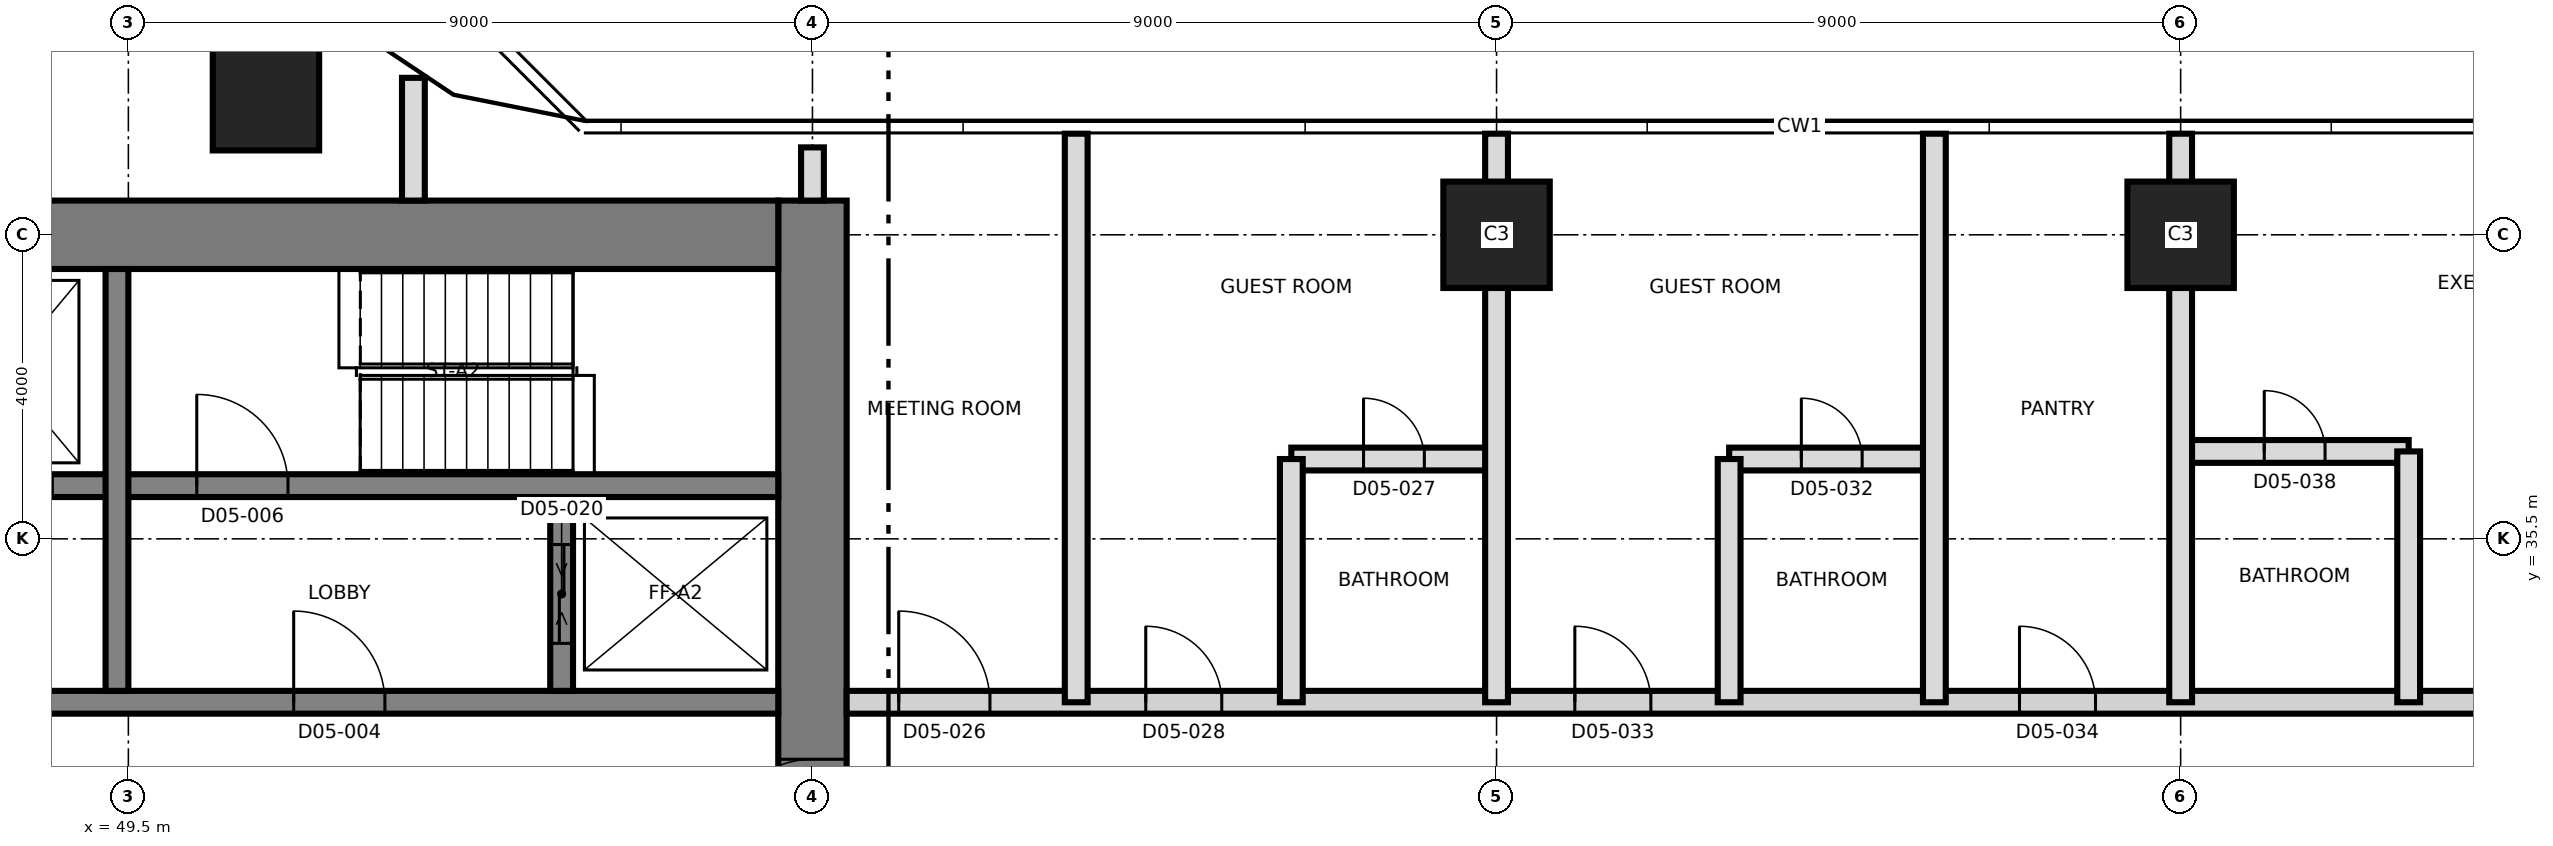
"""IFC4 building model, lengths in metres.
Left out: names, types, materials, properties, quantities, classifications, styles, units other than length and angle.
Written with IfcOpenShell. Run it as: python <this file> out.ifc"""

import sys

from ifc_helpers import new_model, si_unit, direction, frame, frame_2d, origin, origin_2d, place, context, subcontext, project, spatial, rectangle, extrude, element, fill, save


model = new_model("IFC4")
c1 = context("Model", 3, precision=1e-05, world=origin(), true_north=direction((0.0, 1.0)))
c2 = subcontext(c1, "Body", "Model", "MODEL_VIEW")
j1 = project(units=[si_unit("LENGTHUNIT", "METRE"), si_unit("PLANEANGLEUNIT", "RADIAN")], contexts=[c1])
p1 = place(None, origin())
s1 = spatial("IfcSite", under=j1, at=p1, CompositionType="ELEMENT")
p2 = place(p1, origin())
s2 = spatial("IfcBuilding", under=s1, at=p2, CompositionType="ELEMENT")
p3 = place(p2, frame((0.0, 0.0, 70.5)))
s3 = spatial("IfcBuildingStorey", under=s2, at=p3, CompositionType="ELEMENT", Elevation=70.5)
p4 = place(p3, frame((58.5, 21.05, 0.0), z_axis=(0.0, 0.0, 1.0), x_axis=(0.0, 1.0, 0.0)))
e1 = element("IfcWall", 1, at=p4, inside=s3, PredefinedType="SHEAR", context=c2, shape_type="SweptSolid", body=[
    extrude(rectangle(XDim=18.9, YDim=0.9, at=frame_2d((9.45, 0.0))), origin(), (0.0, 0.0, 1.0), 3.7),
])
p5 = place(p4, frame((10.35, 0.0, 0.0)))
e2 = element("IfcOpeningElement", 2, at=p5, cuts=e1, PredefinedType="OPENING", context=c2, shape_type="SweptSolid", body=[
    extrude(rectangle(XDim=1.2, YDim=2.1, at=frame_2d((0.6, 1.05))), frame((0.0, 0.46, 0.0), z_axis=(0.0, -1.0, 0.0), x_axis=(1.0, 0.0, 0.0)), (0.0, 0.0, 1.0), 0.92),
])
p6 = place(p3, frame((31.05, 39.5, 0.0), z_axis=(0.0, 0.0, 1.0), x_axis=(1.0, 0.0, 0.0)))
e3 = element("IfcWall", 3, at=p6, inside=s3, PredefinedType="SHEAR", context=c2, shape_type="SweptSolid", body=[
    extrude(rectangle(XDim=27.0, YDim=0.9, at=frame_2d((13.5, 0.0))), origin(), (0.0, 0.0, 1.0), 3.7),
])
p7 = place(p6, frame((10.65, 0.0, 0.0)))
e4 = element("IfcOpeningElement", 4, at=p7, cuts=e3, PredefinedType="OPENING", context=c2, shape_type="SweptSolid", body=[
    extrude(rectangle(XDim=1.2, YDim=2.1, at=frame_2d((0.6, 1.05))), frame((0.0, 0.46, 0.0), z_axis=(0.0, -1.0, 0.0), x_axis=(1.0, 0.0, 0.0)), (0.0, 0.0, 1.0), 0.92),
])
p8 = place(p3, frame((31.95, 33.35, 0.0), z_axis=(0.0, 0.0, 1.0), x_axis=(1.0, 0.0, 0.0)))
e5 = element("IfcWall", 5, at=p8, inside=s3, PredefinedType="SHEAR", context=c2, shape_type="SweptSolid", body=[
    extrude(rectangle(XDim=26.1, YDim=0.3, at=frame_2d((13.05, 0.0))), origin(), (0.0, 0.0, 1.0), 3.7),
])
p9 = place(p8, frame((13.7, 0.0, 0.0)))
e6 = element("IfcOpeningElement", 6, at=p9, cuts=e5, PredefinedType="OPENING", context=c2, shape_type="SweptSolid", body=[
    extrude(rectangle(XDim=1.4, YDim=2.1, at=frame_2d((0.7, 1.05))), frame((0.0, 0.16, 0.0), z_axis=(0.0, -1.0, 0.0), x_axis=(1.0, 0.0, 0.0)), (0.0, 0.0, 1.0), 0.32),
])
p10 = place(p8, frame((5.175, 0.0, 0.0)))
e7 = element("IfcOpeningElement", 7, at=p10, cuts=e5, PredefinedType="OPENING", context=c2, shape_type="SweptSolid", body=[
    extrude(rectangle(XDim=1.2, YDim=2.1, at=frame_2d((0.6, 1.05))), frame((0.0, 0.16, 0.0), z_axis=(0.0, -1.0, 0.0), x_axis=(1.0, 0.0, 0.0)), (0.0, 0.0, 1.0), 0.32),
])
p11 = place(p8, frame((19.725, 0.0, 0.0)))
e8 = element("IfcOpeningElement", 8, at=p11, cuts=e5, PredefinedType="OPENING", context=c2, shape_type="SweptSolid", body=[
    extrude(rectangle(XDim=1.2, YDim=2.1, at=frame_2d((0.6, 1.05))), frame((0.0, 0.16, 0.0), z_axis=(0.0, -1.0, 0.0), x_axis=(1.0, 0.0, 0.0)), (0.0, 0.0, 1.0), 0.32),
])
p12 = place(p3, frame((43.5, 36.2, 0.0), z_axis=(0.0, 0.0, 1.0), x_axis=(1.0, 0.0, 0.0)))
e9 = element("IfcWall", 9, at=p12, inside=s3, PredefinedType="SHEAR", context=c2, shape_type="SweptSolid", body=[
    extrude(rectangle(XDim=14.55, YDim=0.3, at=frame_2d((7.275, 0.0))), origin(), (0.0, 0.0, 1.0), 3.7),
])
p13 = place(p12, frame((6.9, 0.0, 0.0)))
e10 = element("IfcOpeningElement", 10, at=p13, cuts=e9, PredefinedType="OPENING", context=c2, shape_type="SweptSolid", body=[
    extrude(rectangle(XDim=1.2, YDim=2.1, at=frame_2d((0.6, 1.05))), frame((0.0, 0.16, 0.0), z_axis=(0.0, -1.0, 0.0), x_axis=(1.0, 0.0, 0.0)), (0.0, 0.0, 1.0), 0.32),
])
p14 = place(p12, frame((0.7, 0.0, 0.0)))
e11 = element("IfcOpeningElement", 11, at=p14, cuts=e9, PredefinedType="OPENING", context=c2, shape_type="SweptSolid", body=[
    extrude(rectangle(XDim=1.3, YDim=2.4, at=frame_2d((0.65, 1.2))), frame((0.0, 0.16, 0.0), z_axis=(0.0, -1.0, 0.0), x_axis=(1.0, 0.0, 0.0)), (0.0, 0.0, 1.0), 0.32),
])
p15 = place(p12, frame((3.7, 0.0, 0.0)))
e12 = element("IfcOpeningElement", 12, at=p15, cuts=e9, PredefinedType="OPENING", context=c2, shape_type="SweptSolid", body=[
    extrude(rectangle(XDim=1.3, YDim=2.4, at=frame_2d((0.65, 1.2))), frame((0.0, 0.16, 0.0), z_axis=(0.0, -1.0, 0.0), x_axis=(1.0, 0.0, 0.0)), (0.0, 0.0, 1.0), 0.32),
])
p16 = place(p3, frame((49.35, 33.5, 0.0), z_axis=(0.0, 0.0, 1.0), x_axis=(0.0, 1.0, 0.0)))
e13 = element("IfcWall", 13, at=p16, inside=s3, PredefinedType="SHEAR", context=c2, shape_type="SweptSolid", body=[
    extrude(rectangle(XDim=5.55, YDim=0.3, at=frame_2d((2.775, 0.0))), origin(), (0.0, 0.0, 1.0), 3.7),
])
p17 = place(p3, frame((55.2, 33.5, 0.0), z_axis=(0.0, 0.0, 1.0), x_axis=(0.0, 1.0, 0.0)))
e14 = element("IfcWall", 14, at=p17, inside=s3, PredefinedType="SHEAR", context=c2, shape_type="SweptSolid", body=[
    extrude(rectangle(XDim=2.55, YDim=0.3, at=frame_2d((1.275, 0.0))), origin(), (0.0, 0.0, 1.0), 3.7),
])
p18 = place(p17, frame((0.625, 0.0, 0.0)))
e15 = element("IfcOpeningElement", 15, at=p18, cuts=e14, PredefinedType="OPENING", context=c2, shape_type="SweptSolid", body=[
    extrude(rectangle(XDim=1.3, YDim=2.4, at=frame_2d((0.65, 1.2))), frame((0.0, 0.16, 0.0), z_axis=(0.0, -1.0, 0.0), x_axis=(1.0, 0.0, 0.0)), (0.0, 0.0, 1.0), 0.32),
])
for number, where, z_axis, x_axis in (
    (16, (67.5, 39.5, 0.0), (0.0, 0.0, 1.0), (1.0, 0.0, 0.0)),
    (17, (76.5, 39.5, 0.0), (0.0, 0.0, 1.0), (1.0, 0.0, 0.0)),
    (18, (51.31, 41.31, 0.0), (0.0, 0.0, 1.0), (1.0, 0.0, 0.0)),
):
    element("IfcColumn", number, at=place(p3, frame(where, z_axis=z_axis, x_axis=x_axis)), inside=s3, PredefinedType="COLUMN", context=c2, shape_type="SweptSolid", body=[
        extrude(rectangle(XDim=1.4, YDim=1.4, at=origin_2d()), origin(), (0.0, 0.0, 1.0), 3.7),
    ])
p19 = place(p3, frame((58.95, 33.35, 0.0), z_axis=(0.0, 0.0, 1.0), x_axis=(1.0, 0.0, 0.0)))
e19 = element("IfcWall", 19, at=p19, inside=s3, PredefinedType="PARTITIONING", context=c2, shape_type="SweptSolid", body=[
    extrude(rectangle(XDim=26.38, YDim=0.3, at=frame_2d((13.19, 0.0))), origin(), (0.0, 0.0, 1.0), 3.4),
])
p20 = place(p19, frame((0.685, 0.0, 0.0)))
e20 = element("IfcOpeningElement", 20, at=p20, cuts=e19, PredefinedType="OPENING", context=c2, shape_type="SweptSolid", body=[
    extrude(rectangle(XDim=1.2, YDim=2.1, at=frame_2d((0.6, 1.05))), frame((0.0, 0.16, 0.0), z_axis=(0.0, -1.0, 0.0), x_axis=(1.0, 0.0, 0.0)), (0.0, 0.0, 1.0), 0.32),
])
p21 = place(p19, frame((3.935, 0.0, 0.0)))
e21 = element("IfcOpeningElement", 21, at=p21, cuts=e19, PredefinedType="OPENING", context=c2, shape_type="SweptSolid", body=[
    extrude(rectangle(XDim=1.0, YDim=2.1, at=frame_2d((0.5, 1.05))), frame((0.0, 0.16, 0.0), z_axis=(0.0, -1.0, 0.0), x_axis=(1.0, 0.0, 0.0)), (0.0, 0.0, 1.0), 0.32),
])
p22 = place(p19, frame((9.58, 0.0, 0.0)))
e22 = element("IfcOpeningElement", 22, at=p22, cuts=e19, PredefinedType="OPENING", context=c2, shape_type="SweptSolid", body=[
    extrude(rectangle(XDim=1.0, YDim=2.1, at=frame_2d((0.5, 1.05))), frame((0.0, 0.16, 0.0), z_axis=(0.0, -1.0, 0.0), x_axis=(1.0, 0.0, 0.0)), (0.0, 0.0, 1.0), 0.32),
])
p23 = place(p19, frame((15.43, 0.0, 0.0)))
e23 = element("IfcOpeningElement", 23, at=p23, cuts=e19, PredefinedType="OPENING", context=c2, shape_type="SweptSolid", body=[
    extrude(rectangle(XDim=1.0, YDim=2.1, at=frame_2d((0.5, 1.05))), frame((0.0, 0.16, 0.0), z_axis=(0.0, -1.0, 0.0), x_axis=(1.0, 0.0, 0.0)), (0.0, 0.0, 1.0), 0.32),
])
p24 = place(p19, frame((21.55, 0.0, 0.0)))
e24 = element("IfcOpeningElement", 24, at=p24, cuts=e19, PredefinedType="OPENING", context=c2, shape_type="SweptSolid", body=[
    extrude(rectangle(XDim=1.0, YDim=2.4, at=frame_2d((0.5, 1.2))), frame((0.0, 0.16, 0.0), z_axis=(0.0, -1.0, 0.0), x_axis=(1.0, 0.0, 0.0)), (0.0, 0.0, 1.0), 0.32),
])
p25 = place(p3, frame((64.8, 36.55, 0.0), z_axis=(0.0, 0.0, 1.0), x_axis=(1.0, 0.0, 0.0)))
e25 = element("IfcWall", 25, at=p25, inside=s3, PredefinedType="PARTITIONING", context=c2, shape_type="SweptSolid", body=[
    extrude(rectangle(XDim=2.7, YDim=0.3, at=frame_2d((1.35, 0.0))), origin(), (0.0, 0.0, 1.0), 3.4),
])
p26 = place(p25, frame((0.95, 0.0, 0.0)))
e26 = element("IfcOpeningElement", 26, at=p26, cuts=e25, PredefinedType="OPENING", context=c2, shape_type="SweptSolid", body=[
    extrude(rectangle(XDim=0.8, YDim=2.1, at=frame_2d((0.4, 1.05))), frame((0.0, 0.16, 0.0), z_axis=(0.0, -1.0, 0.0), x_axis=(1.0, 0.0, 0.0)), (0.0, 0.0, 1.0), 0.32),
])
p27 = place(p3, frame((70.56, 36.55, 0.0), z_axis=(0.0, 0.0, 1.0), x_axis=(1.0, 0.0, 0.0)))
e27 = element("IfcWall", 27, at=p27, inside=s3, PredefinedType="PARTITIONING", context=c2, shape_type="SweptSolid", body=[
    extrude(rectangle(XDim=2.7, YDim=0.3, at=frame_2d((1.35, 0.0))), origin(), (0.0, 0.0, 1.0), 3.4),
])
p28 = place(p27, frame((0.95, 0.0, 0.0)))
e28 = element("IfcOpeningElement", 28, at=p28, cuts=e27, PredefinedType="OPENING", context=c2, shape_type="SweptSolid", body=[
    extrude(rectangle(XDim=0.8, YDim=2.1, at=frame_2d((0.4, 1.05))), frame((0.0, 0.16, 0.0), z_axis=(0.0, -1.0, 0.0), x_axis=(1.0, 0.0, 0.0)), (0.0, 0.0, 1.0), 0.32),
])
p29 = place(p3, frame((76.5, 36.65, 0.0), z_axis=(0.0, 0.0, 1.0), x_axis=(1.0, 0.0, 0.0)))
e29 = element("IfcWall", 29, at=p29, inside=s3, PredefinedType="PARTITIONING", context=c2, shape_type="SweptSolid", body=[
    extrude(rectangle(XDim=3.0, YDim=0.3, at=frame_2d((1.5, 0.0))), origin(), (0.0, 0.0, 1.0), 3.4),
])
p30 = place(p29, frame((1.1, 0.0, 0.0)))
e30 = element("IfcOpeningElement", 30, at=p30, cuts=e29, PredefinedType="OPENING", context=c2, shape_type="SweptSolid", body=[
    extrude(rectangle(XDim=0.8, YDim=2.1, at=frame_2d((0.4, 1.05))), frame((0.0, 0.16, 0.0), z_axis=(0.0, -1.0, 0.0), x_axis=(1.0, 0.0, 0.0)), (0.0, 0.0, 1.0), 0.32),
])
p31 = place(p3, frame((53.25, 39.95, 0.0), z_axis=(0.0, 0.0, 1.0), x_axis=(0.0, 1.0, 0.0)))
e31 = element("IfcWall", 31, at=p31, inside=s3, PredefinedType="PARTITIONING", context=c2, shape_type="SweptSolid", body=[
    extrude(rectangle(XDim=1.615, YDim=0.3, at=frame_2d((0.808, 0.0))), origin(), (0.0, 0.0, 1.0), 3.4),
])
p32 = place(p3, frame((58.5, 39.95, 0.0), z_axis=(0.0, 0.0, 1.0), x_axis=(0.0, 1.0, 0.0)))
e32 = element("IfcWall", 32, at=p32, inside=s3, PredefinedType="PARTITIONING", context=c2, shape_type="SweptSolid", body=[
    extrude(rectangle(XDim=0.7, YDim=0.3, at=frame_2d((0.35, 0.0))), origin(), (0.0, 0.0, 1.0), 3.4),
])
p33 = place(p3, frame((61.97, 33.35, 0.0), z_axis=(0.0, 0.0, 1.0), x_axis=(0.0, 1.0, 0.0)))
e33 = element("IfcWall", 33, at=p33, inside=s3, PredefinedType="PARTITIONING", context=c2, shape_type="SweptSolid", body=[
    extrude(rectangle(XDim=7.48, YDim=0.3, at=frame_2d((3.74, 0.0))), origin(), (0.0, 0.0, 1.0), 3.4),
])
p34 = place(p3, frame((64.8, 33.35, 0.0), z_axis=(0.0, 0.0, 1.0), x_axis=(0.0, 1.0, 0.0)))
e34 = element("IfcWall", 34, at=p34, inside=s3, PredefinedType="PARTITIONING", context=c2, shape_type="SweptSolid", body=[
    extrude(rectangle(XDim=3.2, YDim=0.3, at=frame_2d((1.6, 0.0))), origin(), (0.0, 0.0, 1.0), 3.4),
])
p35 = place(p3, frame((67.5, 33.35, 0.0), z_axis=(0.0, 0.0, 1.0), x_axis=(0.0, 1.0, 0.0)))
e35 = element("IfcWall", 35, at=p35, inside=s3, PredefinedType="PARTITIONING", context=c2, shape_type="SweptSolid", body=[
    extrude(rectangle(XDim=7.48, YDim=0.3, at=frame_2d((3.74, 0.0))), origin(), (0.0, 0.0, 1.0), 3.4),
])
p36 = place(p3, frame((70.56, 33.35, 0.0), z_axis=(0.0, 0.0, 1.0), x_axis=(0.0, 1.0, 0.0)))
e36 = element("IfcWall", 36, at=p36, inside=s3, PredefinedType="PARTITIONING", context=c2, shape_type="SweptSolid", body=[
    extrude(rectangle(XDim=3.2, YDim=0.3, at=frame_2d((1.6, 0.0))), origin(), (0.0, 0.0, 1.0), 3.4),
])
for number, where, z_axis, x_axis in (
    (37, (73.26, 33.35, 0.0), (0.0, 0.0, 1.0), (0.0, 1.0, 0.0)),
    (38, (76.5, 33.35, 0.0), (0.0, 0.0, 1.0), (0.0, 1.0, 0.0)),
):
    element("IfcWall", number, at=place(p3, frame(where, z_axis=z_axis, x_axis=x_axis)), inside=s3, PredefinedType="PARTITIONING", context=c2, shape_type="SweptSolid", body=[
        extrude(rectangle(XDim=7.48, YDim=0.3, at=frame_2d((3.74, 0.0))), origin(), (0.0, 0.0, 1.0), 3.4),
    ])
p37 = place(p3, frame((79.5, 33.35, 0.0), z_axis=(0.0, 0.0, 1.0), x_axis=(0.0, 1.0, 0.0)))
e39 = element("IfcWall", 39, at=p37, inside=s3, PredefinedType="PARTITIONING", context=c2, shape_type="SweptSolid", body=[
    extrude(rectangle(XDim=3.3, YDim=0.3, at=frame_2d((1.65, 0.0))), origin(), (0.0, 0.0, 1.0), 3.4),
])
p38 = place(p11, origin())
e40 = element("IfcDoor", 40, at=p38, inside=s3, OperationType="SINGLE_SWING_RIGHT", PredefinedType="DOOR", context=c2, shape_type="SweptSolid", body=[
    extrude(rectangle(XDim=1.2, YDim=2.1, at=frame_2d((0.6, 1.05))), frame((0.0, 0.025, 0.0), z_axis=(0.0, -1.0, 0.0), x_axis=(1.0, 0.0, 0.0)), (0.0, 0.0, 1.0), 0.05),
])
fill(e8, e40)
p39 = place(p13, origin())
e41 = element("IfcDoor", 41, at=p39, inside=s3, OperationType="SINGLE_SWING_LEFT", PredefinedType="DOOR", context=c2, shape_type="SweptSolid", body=[
    extrude(rectangle(XDim=1.2, YDim=2.1, at=frame_2d((0.6, 1.05))), frame((0.0, 0.025, 0.0), z_axis=(0.0, -1.0, 0.0), x_axis=(1.0, 0.0, 0.0)), (0.0, 0.0, 1.0), 0.05),
])
fill(e10, e41)
p40 = place(p5, origin())
e42 = element("IfcDoor", 42, at=p40, inside=s3, OperationType="SINGLE_SWING_LEFT", PredefinedType="DOOR", context=c2, shape_type="SweptSolid", body=[
    extrude(rectangle(XDim=1.2, YDim=2.1, at=frame_2d((0.6, 1.05))), frame((0.0, 0.025, 0.0), z_axis=(0.0, -1.0, 0.0), x_axis=(1.0, 0.0, 0.0)), (0.0, 0.0, 1.0), 0.05),
])
fill(e2, e42)
p41 = place(p18, origin())
e43 = element("IfcDoor", 43, at=p41, inside=s3, OperationType="SLIDING_TO_LEFT", PredefinedType="DOOR", context=c2, shape_type="SweptSolid", body=[
    extrude(rectangle(XDim=1.3, YDim=2.4, at=frame_2d((0.65, 1.2))), frame((0.0, 0.025, 0.0), z_axis=(0.0, -1.0, 0.0), x_axis=(1.0, 0.0, 0.0)), (0.0, 0.0, 1.0), 0.05),
])
fill(e15, e43)
p42 = place(p20, origin())
e44 = element("IfcDoor", 44, at=p42, inside=s3, OperationType="SINGLE_SWING_LEFT", PredefinedType="DOOR", context=c2, shape_type="SweptSolid", body=[
    extrude(rectangle(XDim=1.2, YDim=2.1, at=frame_2d((0.6, 1.05))), frame((0.0, 0.025, 0.0), z_axis=(0.0, -1.0, 0.0), x_axis=(1.0, 0.0, 0.0)), (0.0, 0.0, 1.0), 0.05),
])
fill(e20, e44)
p43 = place(p26, origin())
e45 = element("IfcDoor", 45, at=p43, inside=s3, OperationType="SINGLE_SWING_RIGHT", PredefinedType="DOOR", context=c2, shape_type="SweptSolid", body=[
    extrude(rectangle(XDim=0.8, YDim=2.1, at=frame_2d((0.4, 1.05))), frame((0.0, 0.025, 0.0), z_axis=(0.0, -1.0, 0.0), x_axis=(1.0, 0.0, 0.0)), (0.0, 0.0, 1.0), 0.05),
])
fill(e26, e45)
p44 = place(p21, origin())
e46 = element("IfcDoor", 46, at=p44, inside=s3, OperationType="SINGLE_SWING_LEFT", PredefinedType="DOOR", context=c2, shape_type="SweptSolid", body=[
    extrude(rectangle(XDim=1.0, YDim=2.1, at=frame_2d((0.5, 1.05))), frame((0.0, 0.025, 0.0), z_axis=(0.0, -1.0, 0.0), x_axis=(1.0, 0.0, 0.0)), (0.0, 0.0, 1.0), 0.05),
])
fill(e21, e46)
p45 = place(p28, origin())
e47 = element("IfcDoor", 47, at=p45, inside=s3, OperationType="SINGLE_SWING_LEFT", PredefinedType="DOOR", context=c2, shape_type="SweptSolid", body=[
    extrude(rectangle(XDim=0.8, YDim=2.1, at=frame_2d((0.4, 1.05))), frame((0.0, 0.025, 0.0), z_axis=(0.0, -1.0, 0.0), x_axis=(1.0, 0.0, 0.0)), (0.0, 0.0, 1.0), 0.05),
])
fill(e28, e47)
p46 = place(p22, origin())
e48 = element("IfcDoor", 48, at=p46, inside=s3, OperationType="SINGLE_SWING_LEFT", PredefinedType="DOOR", context=c2, shape_type="SweptSolid", body=[
    extrude(rectangle(XDim=1.0, YDim=2.1, at=frame_2d((0.5, 1.05))), frame((0.0, 0.025, 0.0), z_axis=(0.0, -1.0, 0.0), x_axis=(1.0, 0.0, 0.0)), (0.0, 0.0, 1.0), 0.05),
])
fill(e22, e48)
p47 = place(p23, origin())
e49 = element("IfcDoor", 49, at=p47, inside=s3, OperationType="SINGLE_SWING_RIGHT", PredefinedType="DOOR", context=c2, shape_type="SweptSolid", body=[
    extrude(rectangle(XDim=1.0, YDim=2.1, at=frame_2d((0.5, 1.05))), frame((0.0, 0.025, 0.0), z_axis=(0.0, -1.0, 0.0), x_axis=(1.0, 0.0, 0.0)), (0.0, 0.0, 1.0), 0.05),
])
fill(e23, e49)
p48 = place(p30, origin())
e50 = element("IfcDoor", 50, at=p48, inside=s3, OperationType="SINGLE_SWING_LEFT", PredefinedType="DOOR", context=c2, shape_type="SweptSolid", body=[
    extrude(rectangle(XDim=0.8, YDim=2.1, at=frame_2d((0.4, 1.05))), frame((0.0, 0.025, 0.0), z_axis=(0.0, -1.0, 0.0), x_axis=(1.0, 0.0, 0.0)), (0.0, 0.0, 1.0), 0.05),
])
fill(e30, e50)
save(model, sys.argv[1])
